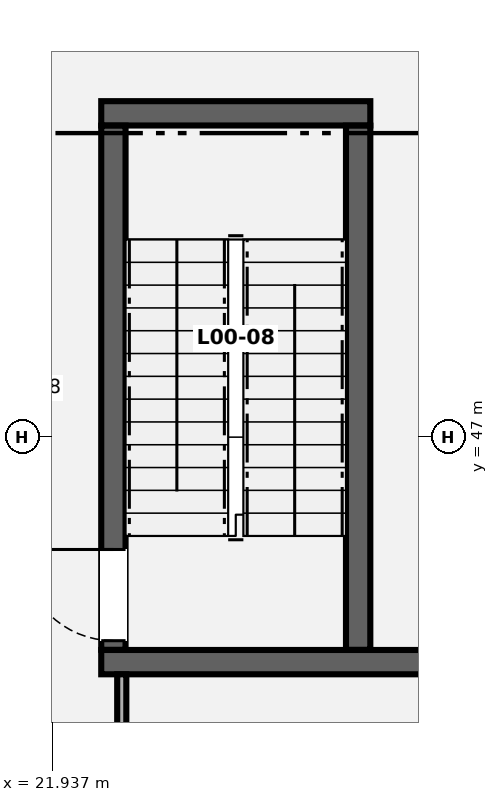
"""IFC4 building model, lengths in metres.
Left out: names, types, materials, properties, quantities, classifications, styles, units other than length and angle.
Written with IfcOpenShell. Run it as: python <this file> out.ifc"""

import sys

from ifc_helpers import new_model, si_unit, direction, frame, frame_2d, origin, place, context, subcontext, project, spatial, rectangle, extrude, element, fill, save


model = new_model("IFC4")
c1 = context("Model", 3, precision=1e-05, world=origin(), true_north=direction((0.0, 1.0)))
c2 = subcontext(c1, "Body", "Model", "MODEL_VIEW")
j1 = project(units=[si_unit("LENGTHUNIT", "METRE"), si_unit("PLANEANGLEUNIT", "RADIAN")], contexts=[c1])
p1 = place(None, origin())
s1 = spatial("IfcSite", under=j1, at=p1, CompositionType="ELEMENT")
p2 = place(p1, origin())
s2 = spatial("IfcBuilding", under=s1, at=p2, CompositionType="ELEMENT")
p3 = place(p2, origin())
s3 = spatial("IfcBuildingStorey", under=s2, at=p3, CompositionType="ELEMENT", Elevation=0.0)
p4 = place(p3, frame((22.58, 44.04, 0.0), z_axis=(0.0, 0.0, 1.0), x_axis=(1.0, 0.0, 0.0)))
e1 = element("IfcWall", 1, at=p4, inside=s3, PredefinedType="SHEAR", context=c2, shape_type="SweptSolid", body=[
    extrude(rectangle(XDim=4.485, YDim=0.32, at=frame_2d((2.242, 0.0))), origin(), (0.0, 0.0, 1.0), 4.7),
])
p5 = place(p3, frame((22.58, 51.26, 0.0), z_axis=(0.0, 0.0, 1.0), x_axis=(1.0, 0.0, 0.0)))
e2 = element("IfcWall", 2, at=p5, inside=s3, PredefinedType="SHEAR", context=c2, shape_type="SweptSolid", body=[
    extrude(rectangle(XDim=3.54, YDim=0.32, at=frame_2d((1.77, 0.0))), origin(), (0.0, 0.0, 1.0), 4.7),
])
p6 = place(p3, frame((22.74, 44.202, 0.0), z_axis=(0.0, 0.0, 1.0), x_axis=(0.0, 1.0, 0.0)))
e3 = element("IfcWall", 3, at=p6, inside=s3, PredefinedType="SHEAR", context=c2, shape_type="SweptSolid", body=[
    extrude(rectangle(XDim=6.896, YDim=0.32, at=frame_2d((3.448, 0.0))), origin(), (0.0, 0.0, 1.0), 4.7),
])
p7 = place(p6, frame((0.12, 0.0, 0.0)))
e4 = element("IfcOpeningElement", 4, at=p7, cuts=e3, PredefinedType="OPENING", context=c2, shape_type="SweptSolid", body=[
    extrude(rectangle(XDim=1.2, YDim=2.15, at=frame_2d((0.6, 1.075))), frame((0.0, 0.17, 0.0), z_axis=(0.0, -1.0, 0.0), x_axis=(1.0, 0.0, 0.0)), (0.0, 0.0, 1.0), 0.34),
])
p8 = place(p3, frame((25.96, 44.202, 0.0), z_axis=(0.0, 0.0, 1.0), x_axis=(0.0, 1.0, 0.0)))
e5 = element("IfcWall", 5, at=p8, inside=s3, PredefinedType="SHEAR", context=c2, shape_type="SweptSolid", body=[
    extrude(rectangle(XDim=6.896, YDim=0.32, at=frame_2d((3.448, 0.0))), origin(), (0.0, 0.0, 1.0), 4.7),
])
p9 = place(p3, frame((22.85, 31.2, 0.0), z_axis=(0.0, 0.0, 1.0), x_axis=(0.0, 1.0, 0.0)))
e6 = element("IfcWall", 6, at=p9, inside=s3, PredefinedType="PARTITIONING", context=c2, shape_type="SweptSolid", body=[
    extrude(rectangle(XDim=12.68, YDim=0.12, at=frame_2d((6.34, 0.0))), origin(), (0.0, 0.0, 1.0), 4.7),
])
p10 = place(p9, frame((5.8, 0.0, 0.0)))
e7 = element("IfcOpeningElement", 7, at=p10, cuts=e6, PredefinedType="OPENING", context=c2, shape_type="SweptSolid", body=[
    extrude(rectangle(XDim=1.08, YDim=2.12, at=frame_2d((0.54, 1.06))), frame((0.0, 0.07, 0.0), z_axis=(0.0, -1.0, 0.0), x_axis=(1.0, 0.0, 0.0)), (0.0, 0.0, 1.0), 0.14),
])
p11 = place(p7, origin())
e8 = element("IfcDoor", 8, at=p11, inside=s3, OperationType="SINGLE_SWING_RIGHT", PredefinedType="DOOR", context=c2, shape_type="SweptSolid", body=[
    extrude(rectangle(XDim=1.2, YDim=2.15, at=frame_2d((0.6, 1.075))), frame((0.0, 0.025, 0.0), z_axis=(0.0, -1.0, 0.0), x_axis=(1.0, 0.0, 0.0)), (0.0, 0.0, 1.0), 0.05),
])
fill(e4, e8)
save(model, sys.argv[1])
